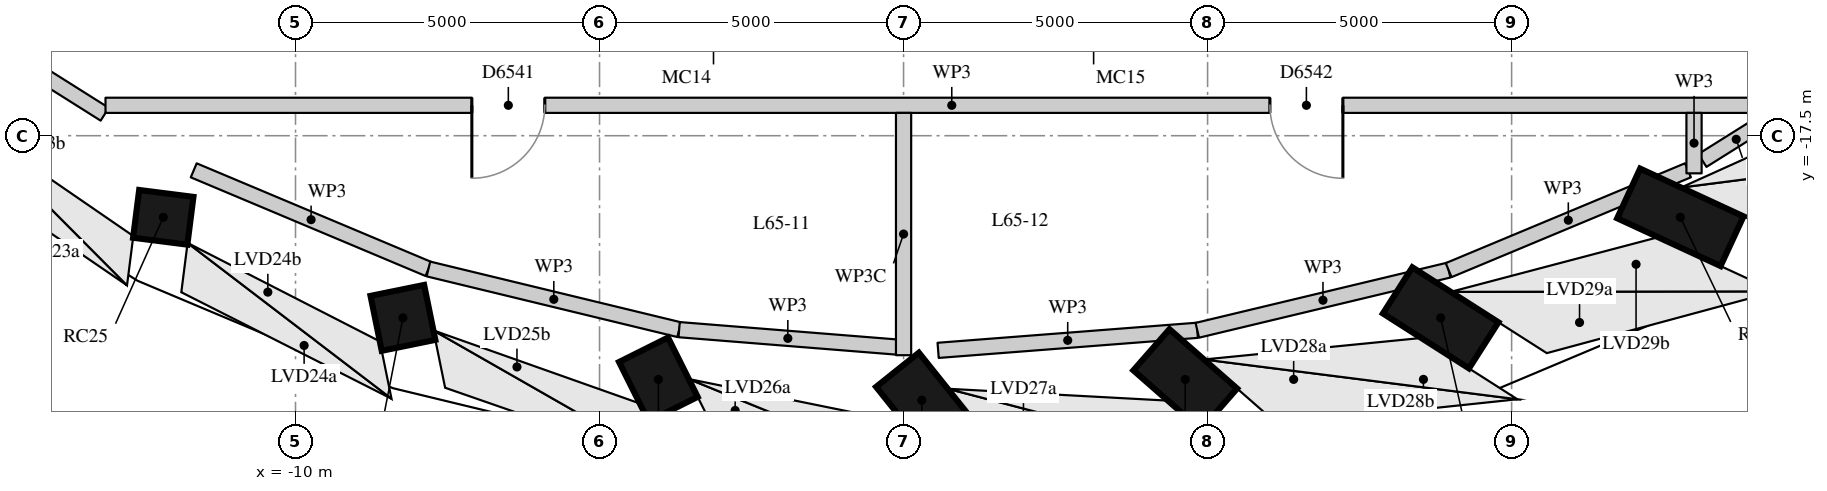
"""IFC4 building model, lengths in metres.
Left out: names, types, materials, properties, quantities, classifications, styles, units other than length and angle.
Written with IfcOpenShell. Run it as: python <this file> out.ifc"""

import sys

from ifc_helpers import new_model, si_unit, direction, frame, frame_2d, origin, origin_2d, place, context, subcontext, project, spatial, rectangle, extrude, element, fill, save


model = new_model("IFC4")
c1 = context("Model", 3, precision=1e-05, world=origin(), true_north=direction((0.0, 1.0)))
c2 = subcontext(c1, "Body", "Model", "MODEL_VIEW")
j1 = project(units=[si_unit("LENGTHUNIT", "METRE"), si_unit("PLANEANGLEUNIT", "RADIAN")], contexts=[c1])
p1 = place(None, origin())
s1 = spatial("IfcSite", under=j1, at=p1, CompositionType="ELEMENT")
p2 = place(p1, origin())
s2 = spatial("IfcBuilding", under=s1, at=p2, CompositionType="ELEMENT")
p3 = place(p2, frame((0.0, 0.0, 228.8)))
s3 = spatial("IfcBuildingStorey", under=s2, at=p3, CompositionType="ELEMENT", Elevation=228.8)
p4 = place(p3, frame((-12.225, -19.235, 0.138), z_axis=(0.023293438415, 0.182825084924, 0.982869474574), x_axis=(-0.124221578206, -0.974987899185, 0.184303000384)))
e1 = element("IfcColumn", 1, at=p4, inside=s3, PredefinedType="COLUMN", context=c2, shape_type="SweptSolid", body=[
    extrude(rectangle(XDim=1.5, YDim=0.9, at=origin_2d()), origin(), (0.0, 0.0, 1.0), 4.297),
])
p5 = place(p3, frame((-8.141, -20.948, 0.162), z_axis=(-0.043151050441, 0.21118900348, 0.976492289603), x_axis=(0.195482310117, -0.956725591842, 0.215552333193)))
e2 = element("IfcColumn", 2, at=p5, inside=s3, PredefinedType="COLUMN", context=c2, shape_type="SweptSolid", body=[
    extrude(rectangle(XDim=1.5, YDim=0.9, at=origin_2d()), origin(), (0.0, 0.0, 1.0), 4.277),
])
p6 = place(p3, frame((-3.789, -21.997, 0.192), z_axis=(-0.114449806757, 0.229186311427, 0.966630682519), x_axis=(0.431857605854, -0.864797019337, 0.256174010415)))
e3 = element("IfcColumn", 3, at=p6, inside=s3, PredefinedType="COLUMN", context=c2, shape_type="SweptSolid", body=[
    extrude(rectangle(XDim=1.5, YDim=0.9, at=origin_2d()), origin(), (0.0, 0.0, 1.0), 4.258),
])
p7 = place(p3, frame((0.7, -22.35, 0.226), z_axis=(-0.188451888787, 0.235550484123, 0.953415887764), x_axis=(0.59561634852, -0.744474996502, 0.301658987863)))
e4 = element("IfcColumn", 4, at=p7, inside=s3, PredefinedType="COLUMN", context=c2, shape_type="SweptSolid", body=[
    extrude(rectangle(XDim=1.5, YDim=0.9, at=origin_2d()), origin(), (0.0, 0.0, 1.0), 4.245),
])
p8 = place(p3, frame((5.189, -21.997, 0.261), z_axis=(-0.262193858169, 0.229973414769, 0.937212147402), x_axis=(0.704586010941, -0.618000940472, 0.348759789485)))
e5 = element("IfcColumn", 5, at=p8, inside=s3, PredefinedType="COLUMN", context=c2, shape_type="SweptSolid", body=[
    extrude(rectangle(XDim=1.5, YDim=0.9, at=origin_2d()), origin(), (0.0, 0.0, 1.0), 4.243),
])
p9 = place(p3, frame((9.541, -20.948, 0.296), z_axis=(-0.332863590702, 0.212380632108, 0.918747134467), x_axis=(0.774522566894, -0.494177185292, 0.394846429526)))
e6 = element("IfcColumn", 6, at=p9, inside=s3, PredefinedType="COLUMN", context=c2, shape_type="SweptSolid", body=[
    extrude(rectangle(XDim=1.5, YDim=0.9, at=origin_2d()), origin(), (0.0, 0.0, 1.0), 4.253),
])
p10 = place(p3, frame((13.625, -19.235, 0.329), z_axis=(-0.39766730526, 0.183784775, 0.898934853482), x_axis=(0.816004150507, -0.377122124994, 0.438082331526)))
e7 = element("IfcColumn", 7, at=p10, inside=s3, PredefinedType="COLUMN", context=c2, shape_type="SweptSolid", body=[
    extrude(rectangle(XDim=1.5, YDim=0.9, at=origin_2d()), origin(), (0.0, 0.0, 1.0), 4.275),
])
p11 = place(p3, frame((-15.155, -15.875, 0.0), z_axis=(0.0, 0.0, 1.0), x_axis=(0.845943681367, -0.533272245627, 0.0)))
e8 = element("IfcWall", 8, at=p11, inside=s3, PredefinedType="PARTITIONING", context=c2, shape_type="SweptSolid", body=[
    extrude(rectangle(XDim=2.384, YDim=0.25, at=frame_2d((1.192, 0.0))), origin(), (0.0, 0.0, 1.0), 4.22),
])
p12 = place(p3, frame((-11.674, -18.07, 0.0), z_axis=(0.0, 0.0, 1.0), x_axis=(0.921899654527, -0.387428737942, 0.0)))
e9 = element("IfcWall", 9, at=p12, inside=s3, PredefinedType="PARTITIONING", context=c2, shape_type="SweptSolid", body=[
    extrude(rectangle(XDim=4.188, YDim=0.25, at=frame_2d((2.094, 0.0))), origin(), (0.0, 0.0, 1.0), 4.22),
])
p13 = place(p3, frame((-7.814, -19.692, 0.0), z_axis=(0.0, 0.0, 1.0), x_axis=(0.971926727308, -0.235283736675, 0.0)))
e10 = element("IfcWall", 10, at=p13, inside=s3, PredefinedType="PARTITIONING", context=c2, shape_type="SweptSolid", body=[
    extrude(rectangle(XDim=4.242, YDim=0.25, at=frame_2d((2.121, 0.0))), origin(), (0.0, 0.0, 1.0), 4.22),
])
p14 = place(p3, frame((-3.691, -20.69, 0.0), z_axis=(0.0, 0.0, 1.0), x_axis=(0.996823497961, -0.079642412771, 0.0)))
e11 = element("IfcWall", 11, at=p14, inside=s3, PredefinedType="PARTITIONING", context=c2, shape_type="SweptSolid", body=[
    extrude(rectangle(XDim=3.587, YDim=0.25, at=frame_2d((1.793, 0.0))), origin(), (0.0, 0.0, 1.0), 4.22),
])
p15 = place(p3, frame((0.569, -21.031, 0.0), z_axis=(0.0, 0.0, 1.0), x_axis=(0.997014711733, 0.077211816374, 0.0)))
e12 = element("IfcWall", 12, at=p15, inside=s3, PredefinedType="PARTITIONING", context=c2, shape_type="SweptSolid", body=[
    extrude(rectangle(XDim=4.275, YDim=0.25, at=frame_2d((2.137, 0.0))), origin(), (0.0, 0.0, 1.0), 4.22),
])
p16 = place(p3, frame((4.831, -20.7, 0.0), z_axis=(0.0, 0.0, 1.0), x_axis=(0.972536224535, 0.232751567056, 0.0)))
e13 = element("IfcWall", 13, at=p16, inside=s3, PredefinedType="PARTITIONING", context=c2, shape_type="SweptSolid", body=[
    extrude(rectangle(XDim=4.25, YDim=0.25, at=frame_2d((2.125, 0.0))), origin(), (0.0, 0.0, 1.0), 4.22),
])
p17 = place(p3, frame((8.964, -19.711, 0.0), z_axis=(0.0, 0.0, 1.0), x_axis=(0.922871881565, 0.38510711525, 0.0)))
e14 = element("IfcWall", 14, at=p17, inside=s3, PredefinedType="PARTITIONING", context=c2, shape_type="SweptSolid", body=[
    extrude(rectangle(XDim=4.265, YDim=0.25, at=frame_2d((2.133, 0.0))), origin(), (0.0, 0.0, 1.0), 4.22),
])
p18 = place(p3, frame((13.138, -17.907, 0.0), z_axis=(0.0, 0.0, 1.0), x_axis=(0.84728708842, 0.531135189756, 0.0)))
e15 = element("IfcWall", 15, at=p18, inside=s3, PredefinedType="PARTITIONING", context=c2, shape_type="SweptSolid", body=[
    extrude(rectangle(XDim=1.313, YDim=0.25, at=frame_2d((0.656, 0.0))), origin(), (0.0, 0.0, 1.0), 4.22),
])
p19 = place(p3, frame((-13.125, -17.0, 0.0), z_axis=(0.0, 0.0, 1.0), x_axis=(1.0, 0.0, 0.0)))
e16 = element("IfcWall", 16, at=p19, inside=s3, PredefinedType="PARTITIONING", context=c2, shape_type="SweptSolid", body=[
    extrude(rectangle(XDim=27.835, YDim=0.25, at=frame_2d((13.918, 0.0))), origin(), (0.0, 0.0, 1.0), 4.22),
])
p20 = place(p19, frame((6.025, 0.0, 0.0)))
e17 = element("IfcOpeningElement", 17, at=p20, cuts=e16, PredefinedType="OPENING", context=c2, shape_type="SweptSolid", body=[
    extrude(rectangle(XDim=1.2, YDim=2.1, at=frame_2d((0.6, 1.05))), frame((0.0, 0.135, 0.0), z_axis=(0.0, -1.0, 0.0), x_axis=(1.0, 0.0, 0.0)), (0.0, 0.0, 1.0), 0.27),
])
p21 = place(p19, frame((19.15, 0.0, 0.0)))
e18 = element("IfcOpeningElement", 18, at=p21, cuts=e16, PredefinedType="OPENING", context=c2, shape_type="SweptSolid", body=[
    extrude(rectangle(XDim=1.2, YDim=2.1, at=frame_2d((0.6, 1.05))), frame((0.0, 0.135, 0.0), z_axis=(0.0, -1.0, 0.0), x_axis=(1.0, 0.0, 0.0)), (0.0, 0.0, 1.0), 0.27),
])
p22 = place(p3, frame((0.0, -21.11, 0.0), z_axis=(0.0, 0.0, 1.0), x_axis=(0.0, 1.0, 0.0)))
e19 = element("IfcWall", 19, at=p22, inside=s3, PredefinedType="PARTITIONING", context=c2, shape_type="SweptSolid", body=[
    extrude(rectangle(XDim=3.985, YDim=0.25, at=frame_2d((1.993, 0.0))), origin(), (0.0, 0.0, 1.0), 3.77),
])
p23 = place(p3, frame((13.0, -18.119, 0.0), z_axis=(0.0, 0.0, 1.0), x_axis=(0.0, 1.0, 0.0)))
e20 = element("IfcWall", 20, at=p23, inside=s3, PredefinedType="PARTITIONING", context=c2, shape_type="SweptSolid", body=[
    extrude(rectangle(XDim=0.994, YDim=0.25, at=frame_2d((0.497, 0.0))), origin(), (0.0, 0.0, 1.0), 4.22),
])
p24 = place(p20, origin())
e21 = element("IfcDoor", 21, at=p24, inside=s3, OperationType="SINGLE_SWING_RIGHT", PredefinedType="DOOR", context=c2, shape_type="SweptSolid", body=[
    extrude(rectangle(XDim=1.2, YDim=2.1, at=frame_2d((0.6, 1.05))), frame((0.0, 0.025, 0.0), z_axis=(0.0, -1.0, 0.0), x_axis=(1.0, 0.0, 0.0)), (0.0, 0.0, 1.0), 0.05),
])
fill(e17, e21)
p25 = place(p21, origin())
e22 = element("IfcDoor", 22, at=p25, inside=s3, OperationType="SINGLE_SWING_LEFT", PredefinedType="DOOR", context=c2, shape_type="SweptSolid", body=[
    extrude(rectangle(XDim=1.2, YDim=2.1, at=frame_2d((0.6, 1.05))), frame((0.0, 0.025, 0.0), z_axis=(0.0, -1.0, 0.0), x_axis=(1.0, 0.0, 0.0)), (0.0, 0.0, 1.0), 0.05),
])
fill(e18, e22)
save(model, sys.argv[1])
